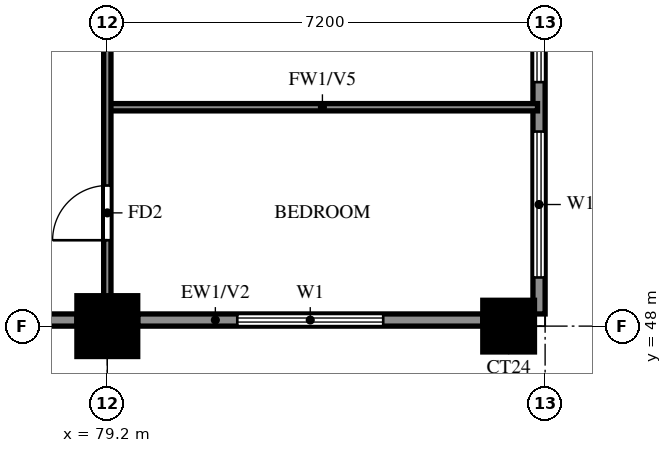
"""IFC4 building model, lengths in metres.
Left out: names, types, materials, properties, quantities, classifications, styles, units other than length and angle.
Written with IfcOpenShell. Run it as: python <this file> out.ifc"""

import sys

from ifc_helpers import new_model, si_unit, direction, frame, frame_2d, origin, origin_2d, place, context, subcontext, project, spatial, rectangle, extrude, source, transform, mapped, element, fill, save


model = new_model("IFC4")
c1 = context("Model", 3, precision=1e-05, world=origin(), true_north=direction((0.0, 1.0)))
c2 = subcontext(c1, "Body", "Model", "MODEL_VIEW")
j1 = project(units=[si_unit("LENGTHUNIT", "METRE"), si_unit("PLANEANGLEUNIT", "RADIAN")], contexts=[c1])
p1 = place(None, origin())
s1 = spatial("IfcSite", under=j1, at=p1, CompositionType="ELEMENT")
p2 = place(p1, origin())
s2 = spatial("IfcBuilding", under=s1, at=p2, CompositionType="ELEMENT")
p3 = place(p2, frame((0.0, 0.0, 150.0)))
s3 = spatial("IfcBuildingStorey", under=s2, at=p3, CompositionType="ELEMENT", Elevation=150.0)
m1 = source(origin(), c2, "Body", "SweptSolid", [
    extrude(rectangle(XDim=1.0, YDim=1.0, at=origin_2d()), origin(), (0.0, 0.0, 1.0), 3.2),
])
p4 = place(p3, frame((79.2, 48.0, 0.0), z_axis=(0.0, 0.0, 1.0), x_axis=(1.0, 0.0, 0.0)))
e1 = element("IfcColumn", 1, at=p4, inside=s3, PredefinedType="COLUMN", context=c2, shape_type="MappedRepresentation", body=[
    mapped(m1, transform((0.0, 0.0, 0.0))),
])
m2 = source(origin(), c2, "Body", "SweptSolid", [
    extrude(rectangle(XDim=0.85, YDim=0.85, at=origin_2d()), origin(), (0.0, 0.0, 1.0), 3.2),
])
p5 = place(p3, frame((85.8, 48.0, 0.0), z_axis=(0.0, 0.0, 1.0), x_axis=(1.0, 0.0, 0.0)))
e2 = element("IfcColumn", 2, at=p5, inside=s3, PredefinedType="COLUMN", context=c2, shape_type="MappedRepresentation", body=[
    mapped(m2, transform((0.0, 0.0, 0.0))),
])
p6 = place(p3, frame((85.719, 39.881, 0.0), z_axis=(0.0, 0.0, 1.0), x_axis=(-0.86377618652, 0.503875678716, 0.0)))
e3 = element("IfcWall", 3, at=p6, inside=s3, PredefinedType="SOLIDWALL", context=c2, shape_type="SweptSolid", body=[
    extrude(rectangle(XDim=16.311, YDim=0.2, at=frame_2d((8.156, 0.0))), origin(), (0.0, 0.0, 1.0), 3.2),
])
p7 = place(p6, frame((13.326, 0.0, 1.5)))
e4 = element("IfcOpeningElement", 4, at=p7, cuts=e3, PredefinedType="OPENING", context=c2, shape_type="SweptSolid", body=[
    extrude(rectangle(XDim=0.9, YDim=0.9, at=frame_2d((0.45, 0.45))), frame((0.0, 0.11, 0.0), z_axis=(0.0, -1.0, 0.0), x_axis=(1.0, 0.0, 0.0)), (0.0, 0.0, 1.0), 0.22),
])
p8 = place(p3, frame((71.99, 48.1, 0.0), z_axis=(0.0, 0.0, 1.0), x_axis=(1.0, 0.0, 0.0)))
e5 = element("IfcWall", 5, at=p8, inside=s3, PredefinedType="SOLIDWALL", context=c2, shape_type="SweptSolid", body=[
    extrude(rectangle(XDim=6.71, YDim=0.2, at=frame_2d((3.355, 0.0))), origin(), (0.0, 0.0, 1.0), 3.2),
])
p9 = place(p8, frame((2.205, 0.0, 1.5)))
e6 = element("IfcOpeningElement", 6, at=p9, cuts=e5, PredefinedType="OPENING", context=c2, shape_type="SweptSolid", body=[
    extrude(rectangle(XDim=0.9, YDim=0.9, at=frame_2d((0.45, 0.45))), frame((0.0, 0.11, 0.0), z_axis=(0.0, -1.0, 0.0), x_axis=(1.0, 0.0, 0.0)), (0.0, 0.0, 1.0), 0.22),
])
p10 = place(p3, frame((79.7, 48.1, 0.0), z_axis=(0.0, 0.0, 1.0), x_axis=(1.0, 0.0, 0.0)))
e7 = element("IfcWall", 7, at=p10, inside=s3, PredefinedType="SOLIDWALL", context=c2, shape_type="SweptSolid", body=[
    extrude(rectangle(XDim=5.675, YDim=0.2, at=frame_2d((2.837, 0.0))), origin(), (0.0, 0.0, 1.0), 3.2),
])
p11 = place(p10, frame((1.637, 0.0, 0.6)))
e8 = element("IfcOpeningElement", 8, at=p11, cuts=e7, PredefinedType="OPENING", context=c2, shape_type="SweptSolid", body=[
    extrude(rectangle(XDim=2.4, YDim=2.4, at=frame_2d((1.2, 1.2))), frame((0.0, 0.11, 0.0), z_axis=(0.0, -1.0, 0.0), x_axis=(1.0, 0.0, 0.0)), (0.0, 0.0, 1.0), 0.22),
])
p12 = place(p3, frame((86.3, 48.2, 0.0), z_axis=(0.0, 0.0, 1.0), x_axis=(0.0, 1.0, 0.0)))
e9 = element("IfcWall", 9, at=p12, inside=s3, PredefinedType="SOLIDWALL", context=c2, shape_type="SweptSolid", body=[
    extrude(rectangle(XDim=28.6, YDim=0.2, at=frame_2d((14.3, 0.0))), origin(), (0.0, 0.0, 1.0), 3.2),
])
p13 = place(p12, frame((11.5, 0.0, 0.0)))
e10 = element("IfcOpeningElement", 10, at=p13, cuts=e9, PredefinedType="OPENING", context=c2, shape_type="SweptSolid", body=[
    extrude(rectangle(XDim=1.8, YDim=2.4, at=frame_2d((0.9, 1.2))), frame((0.0, 0.11, 0.0), z_axis=(0.0, -1.0, 0.0), x_axis=(1.0, 0.0, 0.0)), (0.0, 0.0, 1.0), 0.22),
])
p14 = place(p12, frame((0.6, 0.0, 0.6)))
e11 = element("IfcOpeningElement", 11, at=p14, cuts=e9, PredefinedType="OPENING", context=c2, shape_type="SweptSolid", body=[
    extrude(rectangle(XDim=2.4, YDim=2.4, at=frame_2d((1.2, 1.2))), frame((0.0, 0.11, 0.0), z_axis=(0.0, -1.0, 0.0), x_axis=(1.0, 0.0, 0.0)), (0.0, 0.0, 1.0), 0.22),
])
p15 = place(p12, frame((3.812, 0.0, 0.6)))
e12 = element("IfcOpeningElement", 12, at=p15, cuts=e9, PredefinedType="OPENING", context=c2, shape_type="SweptSolid", body=[
    extrude(rectangle(XDim=2.4, YDim=2.4, at=frame_2d((1.2, 1.2))), frame((0.0, 0.11, 0.0), z_axis=(0.0, -1.0, 0.0), x_axis=(1.0, 0.0, 0.0)), (0.0, 0.0, 1.0), 0.22),
])
p16 = place(p12, frame((7.488, 0.0, 0.6)))
e13 = element("IfcOpeningElement", 13, at=p16, cuts=e9, PredefinedType="OPENING", context=c2, shape_type="SweptSolid", body=[
    extrude(rectangle(XDim=1.8, YDim=2.4, at=frame_2d((0.9, 1.2))), frame((0.0, 0.11, 0.0), z_axis=(0.0, -1.0, 0.0), x_axis=(1.0, 0.0, 0.0)), (0.0, 0.0, 1.0), 0.22),
])
p17 = place(p12, frame((14.837, 0.0, 1.5)))
e14 = element("IfcOpeningElement", 14, at=p17, cuts=e9, PredefinedType="OPENING", context=c2, shape_type="SweptSolid", body=[
    extrude(rectangle(XDim=0.9, YDim=0.9, at=frame_2d((0.45, 0.45))), frame((0.0, 0.11, 0.0), z_axis=(0.0, -1.0, 0.0), x_axis=(1.0, 0.0, 0.0)), (0.0, 0.0, 1.0), 0.22),
])
p18 = place(p12, frame((16.75, 0.0, 1.5)))
e15 = element("IfcOpeningElement", 15, at=p18, cuts=e9, PredefinedType="OPENING", context=c2, shape_type="SweptSolid", body=[
    extrude(rectangle(XDim=0.9, YDim=0.9, at=frame_2d((0.45, 0.45))), frame((0.0, 0.11, 0.0), z_axis=(0.0, -1.0, 0.0), x_axis=(1.0, 0.0, 0.0)), (0.0, 0.0, 1.0), 0.22),
])
p19 = place(p12, frame((18.212, 0.0, 0.6)))
e16 = element("IfcOpeningElement", 16, at=p19, cuts=e9, PredefinedType="OPENING", context=c2, shape_type="SweptSolid", body=[
    extrude(rectangle(XDim=2.4, YDim=2.4, at=frame_2d((1.2, 1.2))), frame((0.0, 0.11, 0.0), z_axis=(0.0, -1.0, 0.0), x_axis=(1.0, 0.0, 0.0)), (0.0, 0.0, 1.0), 0.22),
])
p20 = place(p12, frame((22.188, 0.0, 0.6)))
e17 = element("IfcOpeningElement", 17, at=p20, cuts=e9, PredefinedType="OPENING", context=c2, shape_type="SweptSolid", body=[
    extrude(rectangle(XDim=2.4, YDim=2.4, at=frame_2d((1.2, 1.2))), frame((0.0, 0.11, 0.0), z_axis=(0.0, -1.0, 0.0), x_axis=(1.0, 0.0, 0.0)), (0.0, 0.0, 1.0), 0.22),
])
p21 = place(p12, frame((25.413, 0.0, 0.6)))
e18 = element("IfcOpeningElement", 18, at=p21, cuts=e9, PredefinedType="OPENING", context=c2, shape_type="SweptSolid", body=[
    extrude(rectangle(XDim=2.4, YDim=2.4, at=frame_2d((1.2, 1.2))), frame((0.0, 0.11, 0.0), z_axis=(0.0, -1.0, 0.0), x_axis=(1.0, 0.0, 0.0)), (0.0, 0.0, 1.0), 0.22),
])
p22 = place(p3, frame((79.2, 51.6, 0.0), z_axis=(0.0, 0.0, 1.0), x_axis=(1.0, 0.0, 0.0)))
e19 = element("IfcWall", 19, at=p22, inside=s3, PredefinedType="PARTITIONING", context=c2, shape_type="SweptSolid", body=[
    extrude(rectangle(XDim=7.075, YDim=0.12, at=frame_2d((3.538, 0.0))), origin(), (0.0, 0.0, 1.0), 2.3),
])
p23 = place(p3, frame((79.2, 48.125, 0.0), z_axis=(0.0, 0.0, 1.0), x_axis=(0.0, 1.0, 0.0)))
e20 = element("IfcWall", 20, at=p23, inside=s3, PredefinedType="PARTITIONING", context=c2, shape_type="SweptSolid", body=[
    extrude(rectangle(XDim=14.275, YDim=0.12, at=frame_2d((7.137, 0.0))), origin(), (0.0, 0.0, 1.0), 3.2),
])
p24 = place(p23, frame((1.288, 0.0, 0.0)))
e21 = element("IfcOpeningElement", 21, at=p24, cuts=e20, PredefinedType="OPENING", context=c2, shape_type="SweptSolid", body=[
    extrude(rectangle(XDim=0.9, YDim=2.1, at=frame_2d((0.45, 1.05))), frame((0.0, 0.07, 0.0), z_axis=(0.0, -1.0, 0.0), x_axis=(1.0, 0.0, 0.0)), (0.0, 0.0, 1.0), 0.14),
])
p25 = place(p23, frame((7.825, 0.0, 0.0)))
e22 = element("IfcOpeningElement", 22, at=p25, cuts=e20, PredefinedType="OPENING", context=c2, shape_type="SweptSolid", body=[
    extrude(rectangle(XDim=1.5, YDim=2.1, at=frame_2d((0.75, 1.05))), frame((0.0, 0.07, 0.0), z_axis=(0.0, -1.0, 0.0), x_axis=(1.0, 0.0, 0.0)), (0.0, 0.0, 1.0), 0.14),
])
p26 = place(p23, frame((12.025, 0.0, 0.0)))
e23 = element("IfcOpeningElement", 23, at=p26, cuts=e20, PredefinedType="OPENING", context=c2, shape_type="SweptSolid", body=[
    extrude(rectangle(XDim=0.9, YDim=2.1, at=frame_2d((0.45, 1.05))), frame((0.0, 0.07, 0.0), z_axis=(0.0, -1.0, 0.0), x_axis=(1.0, 0.0, 0.0)), (0.0, 0.0, 1.0), 0.14),
])
p27 = place(p11, origin())
e24 = element("IfcWindow", 24, at=p27, inside=s3, PartitioningType="DOUBLE_PANEL_VERTICAL", PredefinedType="WINDOW", context=c2, shape_type="SweptSolid", body=[
    extrude(rectangle(XDim=2.4, YDim=2.4, at=frame_2d((1.2, 1.2))), frame((0.0, 0.03, 0.0), z_axis=(0.0, -1.0, 0.0), x_axis=(1.0, 0.0, 0.0)), (0.0, 0.0, 1.0), 0.06),
])
fill(e8, e24)
p28 = place(p14, origin())
e25 = element("IfcWindow", 25, at=p28, inside=s3, PartitioningType="DOUBLE_PANEL_VERTICAL", PredefinedType="WINDOW", context=c2, shape_type="SweptSolid", body=[
    extrude(rectangle(XDim=2.4, YDim=2.4, at=frame_2d((1.2, 1.2))), frame((0.0, 0.03, 0.0), z_axis=(0.0, -1.0, 0.0), x_axis=(1.0, 0.0, 0.0)), (0.0, 0.0, 1.0), 0.06),
])
fill(e11, e25)
p29 = place(p15, origin())
e26 = element("IfcWindow", 26, at=p29, inside=s3, PartitioningType="DOUBLE_PANEL_VERTICAL", PredefinedType="WINDOW", context=c2, shape_type="SweptSolid", body=[
    extrude(rectangle(XDim=2.4, YDim=2.4, at=frame_2d((1.2, 1.2))), frame((0.0, 0.03, 0.0), z_axis=(0.0, -1.0, 0.0), x_axis=(1.0, 0.0, 0.0)), (0.0, 0.0, 1.0), 0.06),
])
fill(e12, e26)
p30 = place(p24, origin())
e27 = element("IfcDoor", 27, at=p30, inside=s3, OperationType="SINGLE_SWING_LEFT", PredefinedType="DOOR", context=c2, shape_type="SweptSolid", body=[
    extrude(rectangle(XDim=0.9, YDim=2.1, at=frame_2d((0.45, 1.05))), frame((0.0, 0.025, 0.0), z_axis=(0.0, -1.0, 0.0), x_axis=(1.0, 0.0, 0.0)), (0.0, 0.0, 1.0), 0.05),
])
fill(e21, e27)
save(model, sys.argv[1])
